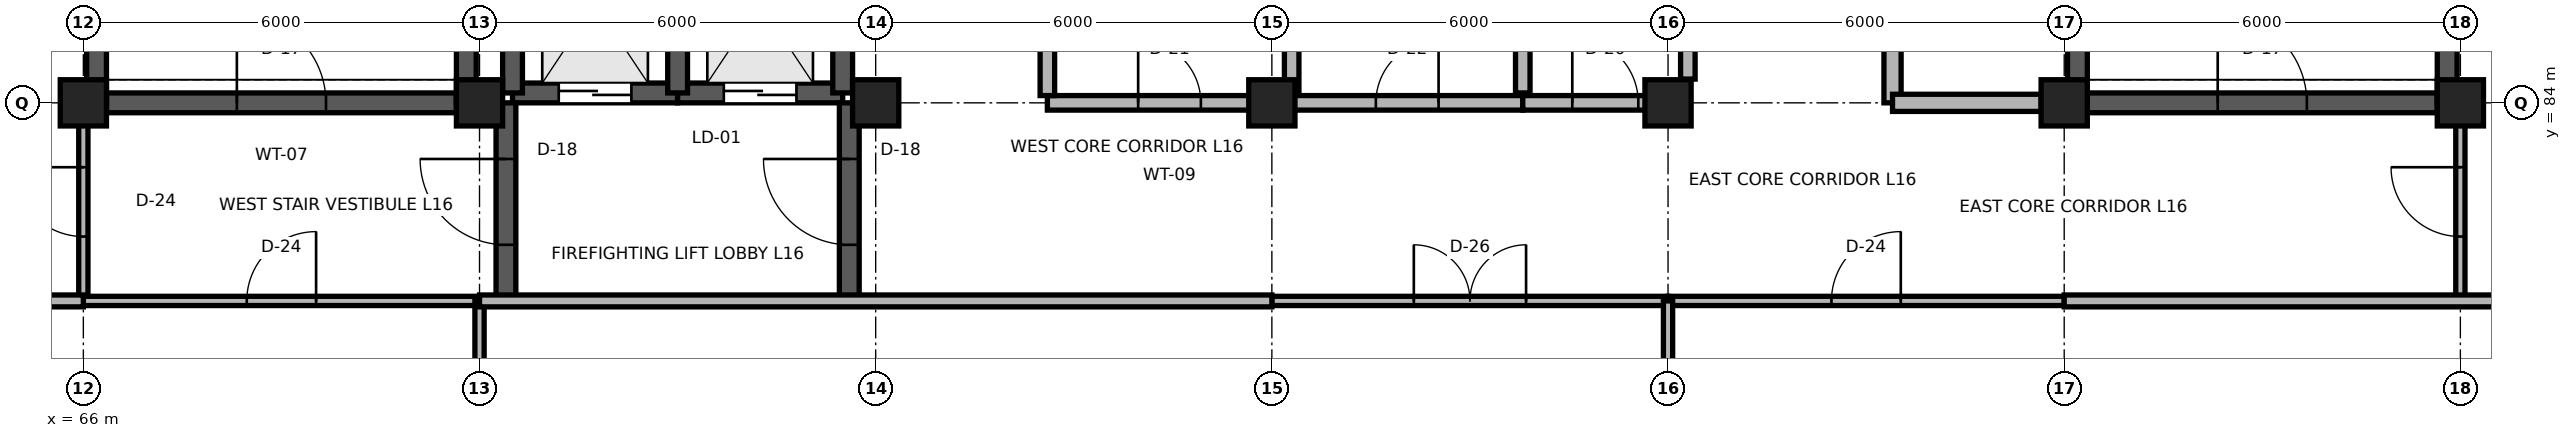
"""IFC4 building model, lengths in metres.
Left out: names, types, materials, properties, quantities, classifications, styles, units other than length and angle.
Written with IfcOpenShell. Run it as: python <this file> out.ifc"""

import sys

from ifc_helpers import new_model, si_unit, direction, frame, frame_2d, origin, origin_2d, place, context, subcontext, project, spatial, rectangle, extrude, element, fill, save


model = new_model("IFC4")
c1 = context("Model", 3, precision=1e-05, world=origin(), true_north=direction((0.0, 1.0)))
c2 = subcontext(c1, "Body", "Model", "MODEL_VIEW")
j1 = project(units=[si_unit("LENGTHUNIT", "METRE"), si_unit("PLANEANGLEUNIT", "RADIAN")], contexts=[c1])
p1 = place(None, origin())
s1 = spatial("IfcSite", under=j1, at=p1, CompositionType="ELEMENT")
p2 = place(p1, origin())
s2 = spatial("IfcBuilding", under=s1, at=p2, CompositionType="ELEMENT")
p3 = place(p2, frame((0.0, 0.0, 63.9)))
s3 = spatial("IfcBuildingStorey", under=s2, at=p3, CompositionType="ELEMENT", Elevation=63.9)
for number, where, z_axis, x_axis in (
    (1, (66.0, 84.0, 0.0), (0.0, 0.0, 1.0), (1.0, 0.0, 0.0)),
    (2, (72.0, 84.0, 0.0), (0.0, 0.0, 1.0), (1.0, 0.0, 0.0)),
    (3, (78.0, 84.0, 0.0), (0.0, 0.0, 1.0), (1.0, 0.0, 0.0)),
    (4, (84.0, 84.0, 0.0), (0.0, 0.0, 1.0), (1.0, 0.0, 0.0)),
    (5, (90.0, 84.0, 0.0), (0.0, 0.0, 1.0), (1.0, 0.0, 0.0)),
    (6, (96.0, 84.0, 0.0), (0.0, 0.0, 1.0), (1.0, 0.0, 0.0)),
    (7, (102.0, 84.0, 0.0), (0.0, 0.0, 1.0), (1.0, 0.0, 0.0)),
):
    element("IfcColumn", number, at=place(p3, frame(where, z_axis=z_axis, x_axis=x_axis)), inside=s3, PredefinedType="COLUMN", context=c2, shape_type="SweptSolid", body=[
        extrude(rectangle(XDim=0.7, YDim=0.7, at=origin_2d()), origin(), (0.0, 0.0, 1.0), 3.9),
    ])
p4 = place(p3, frame((66.35, 84.0, 0.0), z_axis=(0.0, 0.0, 1.0), x_axis=(1.0, 0.0, 0.0)))
e8 = element("IfcWall", 8, at=p4, inside=s3, PredefinedType="SHEAR", context=c2, shape_type="SweptSolid", body=[
    extrude(rectangle(XDim=5.3, YDim=0.3, at=frame_2d((2.65, 0.0))), origin(), (0.0, 0.0, 1.0), 3.66),
])
p5 = place(p4, frame((1.975, 0.0, 0.0)))
e9 = element("IfcOpeningElement", 9, at=p5, cuts=e8, PredefinedType="OPENING", context=c2, shape_type="SweptSolid", body=[
    extrude(rectangle(XDim=1.35, YDim=2.2, at=frame_2d((0.675, 1.1))), frame((0.0, 0.165, 0.0), z_axis=(0.0, -1.0, 0.0), x_axis=(1.0, 0.0, 0.0)), (0.0, 0.0, 1.0), 0.33),
])
for number, where, z_axis, x_axis in (
    (10, (66.2, 84.0, 0.0), (0.0, 0.0, 1.0), (0.0, 1.0, 0.0)),
    (11, (71.8, 84.0, 0.0), (0.0, 0.0, 1.0), (0.0, 1.0, 0.0)),
):
    element("IfcWall", number, at=place(p3, frame(where, z_axis=z_axis, x_axis=x_axis)), inside=s3, PredefinedType="SHEAR", context=c2, shape_type="SweptSolid", body=[
        extrude(rectangle(XDim=11.8, YDim=0.3, at=frame_2d((5.9, 0.0))), origin(), (0.0, 0.0, 1.0), 3.66),
    ])
p6 = place(p3, frame((96.35, 84.0, 0.0), z_axis=(0.0, 0.0, 1.0), x_axis=(1.0, 0.0, 0.0)))
e12 = element("IfcWall", 12, at=p6, inside=s3, PredefinedType="SHEAR", context=c2, shape_type="SweptSolid", body=[
    extrude(rectangle(XDim=5.3, YDim=0.3, at=frame_2d((2.65, 0.0))), origin(), (0.0, 0.0, 1.0), 3.66),
])
p7 = place(p6, frame((1.975, 0.0, 0.0)))
e13 = element("IfcOpeningElement", 13, at=p7, cuts=e12, PredefinedType="OPENING", context=c2, shape_type="SweptSolid", body=[
    extrude(rectangle(XDim=1.35, YDim=2.2, at=frame_2d((0.675, 1.1))), frame((0.0, 0.165, 0.0), z_axis=(0.0, -1.0, 0.0), x_axis=(1.0, 0.0, 0.0)), (0.0, 0.0, 1.0), 0.33),
])
for number, where, z_axis, x_axis in (
    (14, (96.2, 84.0, 0.0), (0.0, 0.0, 1.0), (0.0, 1.0, 0.0)),
    (15, (101.8, 84.0, 0.0), (0.0, 0.0, 1.0), (0.0, 1.0, 0.0)),
):
    element("IfcWall", number, at=place(p3, frame(where, z_axis=z_axis, x_axis=x_axis)), inside=s3, PredefinedType="SHEAR", context=c2, shape_type="SweptSolid", body=[
        extrude(rectangle(XDim=11.8, YDim=0.3, at=frame_2d((5.9, 0.0))), origin(), (0.0, 0.0, 1.0), 3.66),
    ])
p8 = place(p3, frame((72.5, 84.15, 0.0), z_axis=(0.0, 0.0, 1.0), x_axis=(1.0, 0.0, 0.0)))
e16 = element("IfcWall", 16, at=p8, inside=s3, PredefinedType="SHEAR", context=c2, shape_type="SweptSolid", body=[
    extrude(rectangle(XDim=2.5, YDim=0.3, at=frame_2d((1.25, 0.0))), origin(), (0.0, 0.0, 1.0), 3.66),
])
p9 = place(p8, frame((0.7, 0.0, 0.0)))
e17 = element("IfcOpeningElement", 17, at=p9, cuts=e16, PredefinedType="OPENING", context=c2, shape_type="SweptSolid", body=[
    extrude(rectangle(XDim=1.1, YDim=2.1, at=frame_2d((0.55, 1.05))), frame((0.0, 0.165, 0.0), z_axis=(0.0, -1.0, 0.0), x_axis=(1.0, 0.0, 0.0)), (0.0, 0.0, 1.0), 0.33),
])
p10 = place(p3, frame((72.5, 84.15, 0.0), z_axis=(0.0, 0.0, 1.0), x_axis=(0.0, 1.0, 0.0)))
e18 = element("IfcWall", 18, at=p10, inside=s3, PredefinedType="SHEAR", context=c2, shape_type="SweptSolid", body=[
    extrude(rectangle(XDim=3.4, YDim=0.3, at=frame_2d((1.7, 0.0))), origin(), (0.0, 0.0, 1.0), 3.66),
])
p11 = place(p3, frame((75.0, 84.15, 0.0), z_axis=(0.0, 0.0, 1.0), x_axis=(1.0, 0.0, 0.0)))
e19 = element("IfcWall", 19, at=p11, inside=s3, PredefinedType="SHEAR", context=c2, shape_type="SweptSolid", body=[
    extrude(rectangle(XDim=2.5, YDim=0.3, at=frame_2d((1.25, 0.0))), origin(), (0.0, 0.0, 1.0), 3.66),
])
p12 = place(p11, frame((0.7, 0.0, 0.0)))
e20 = element("IfcOpeningElement", 20, at=p12, cuts=e19, PredefinedType="OPENING", context=c2, shape_type="SweptSolid", body=[
    extrude(rectangle(XDim=1.1, YDim=2.1, at=frame_2d((0.55, 1.05))), frame((0.0, 0.165, 0.0), z_axis=(0.0, -1.0, 0.0), x_axis=(1.0, 0.0, 0.0)), (0.0, 0.0, 1.0), 0.33),
])
for number, where, z_axis, x_axis in (
    (21, (75.0, 84.15, 0.0), (0.0, 0.0, 1.0), (0.0, 1.0, 0.0)),
    (22, (77.5, 84.15, 0.0), (0.0, 0.0, 1.0), (0.0, 1.0, 0.0)),
):
    element("IfcWall", number, at=place(p3, frame(where, z_axis=z_axis, x_axis=x_axis)), inside=s3, PredefinedType="SHEAR", context=c2, shape_type="SweptSolid", body=[
        extrude(rectangle(XDim=3.4, YDim=0.3, at=frame_2d((1.7, 0.0))), origin(), (0.0, 0.0, 1.0), 3.66),
    ])
p13 = place(p3, frame((93.4, 84.0, 0.0), z_axis=(0.0, 0.0, 1.0), x_axis=(0.0, 1.0, 0.0)))
e23 = element("IfcWall", 23, at=p13, inside=s3, PredefinedType="PARTITIONING", context=c2, shape_type="SweptSolid", body=[
    extrude(rectangle(XDim=11.96, YDim=0.26, at=frame_2d((5.98, 0.0))), origin(), (0.0, 0.0, 1.0), 3.66),
])
p14 = place(p13, frame((3.425, 0.0, 0.0)))
e24 = element("IfcOpeningElement", 24, at=p14, cuts=e23, PredefinedType="OPENING", context=c2, shape_type="SweptSolid", body=[
    extrude(rectangle(XDim=1.15, YDim=2.2, at=frame_2d((0.575, 1.1))), frame((0.0, 0.145, 0.0), z_axis=(0.0, -1.0, 0.0), x_axis=(1.0, 0.0, 0.0)), (0.0, 0.0, 1.0), 0.29),
])
p15 = place(p3, frame((93.4, 84.0, 0.0), z_axis=(0.0, 0.0, 1.0), x_axis=(1.0, 0.0, 0.0)))
e25 = element("IfcWall", 25, at=p15, inside=s3, PredefinedType="PARTITIONING", context=c2, shape_type="SweptSolid", body=[
    extrude(rectangle(XDim=2.25, YDim=0.26, at=frame_2d((1.125, 0.0))), origin(), (0.0, 0.0, 1.0), 3.369),
])
p16 = place(p3, frame((72.4, 81.0, 0.0), z_axis=(0.0, 0.0, 1.0), x_axis=(0.0, 1.0, 0.0)))
e26 = element("IfcWall", 26, at=p16, inside=s3, PredefinedType="SHEAR", context=c2, shape_type="SweptSolid", body=[
    extrude(rectangle(XDim=3.0, YDim=0.3, at=frame_2d((1.5, 0.0))), origin(), (0.0, 0.0, 1.0), 3.66),
])
p17 = place(p16, frame((0.85, 0.0, 0.0)))
e27 = element("IfcOpeningElement", 27, at=p17, cuts=e26, PredefinedType="OPENING", context=c2, shape_type="SweptSolid", body=[
    extrude(rectangle(XDim=1.3, YDim=2.2, at=frame_2d((0.65, 1.1))), frame((0.0, 0.165, 0.0), z_axis=(0.0, -1.0, 0.0), x_axis=(1.0, 0.0, 0.0)), (0.0, 0.0, 1.0), 0.33),
])
p18 = place(p3, frame((77.6, 81.0, 0.0), z_axis=(0.0, 0.0, 1.0), x_axis=(0.0, 1.0, 0.0)))
e28 = element("IfcWall", 28, at=p18, inside=s3, PredefinedType="SHEAR", context=c2, shape_type="SweptSolid", body=[
    extrude(rectangle(XDim=3.0, YDim=0.3, at=frame_2d((1.5, 0.0))), origin(), (0.0, 0.0, 1.0), 3.66),
])
p19 = place(p18, frame((0.85, 0.0, 0.0)))
e29 = element("IfcOpeningElement", 29, at=p19, cuts=e28, PredefinedType="OPENING", context=c2, shape_type="SweptSolid", body=[
    extrude(rectangle(XDim=1.3, YDim=2.2, at=frame_2d((0.65, 1.1))), frame((0.0, 0.165, 0.0), z_axis=(0.0, -1.0, 0.0), x_axis=(1.0, 0.0, 0.0)), (0.0, 0.0, 1.0), 0.33),
])
p20 = place(p3, frame((80.6, 84.0, 0.0), z_axis=(0.0, 0.0, 1.0), x_axis=(1.0, 0.0, 0.0)))
e30 = element("IfcWall", 30, at=p20, inside=s3, PredefinedType="PARTITIONING", context=c2, shape_type="SweptSolid", body=[
    extrude(rectangle(XDim=3.7, YDim=0.22, at=frame_2d((1.85, 0.0))), origin(), (0.0, 0.0, 1.0), 3.369),
])
p21 = place(p20, frame((1.375, 0.0, 0.0)))
e31 = element("IfcOpeningElement", 31, at=p21, cuts=e30, PredefinedType="OPENING", context=c2, shape_type="SweptSolid", body=[
    extrude(rectangle(XDim=0.95, YDim=2.15, at=frame_2d((0.475, 1.075))), frame((0.0, 0.125, 0.0), z_axis=(0.0, -1.0, 0.0), x_axis=(1.0, 0.0, 0.0)), (0.0, 0.0, 1.0), 0.25),
])
p22 = place(p3, frame((84.3, 84.0, 0.0), z_axis=(0.0, 0.0, 1.0), x_axis=(1.0, 0.0, 0.0)))
e32 = element("IfcWall", 32, at=p22, inside=s3, PredefinedType="PARTITIONING", context=c2, shape_type="SweptSolid", body=[
    extrude(rectangle(XDim=3.5, YDim=0.22, at=frame_2d((1.75, 0.0))), origin(), (0.0, 0.0, 1.0), 3.369),
])
p23 = place(p22, frame((1.275, 0.0, 0.0)))
e33 = element("IfcOpeningElement", 33, at=p23, cuts=e32, PredefinedType="OPENING", context=c2, shape_type="SweptSolid", body=[
    extrude(rectangle(XDim=0.95, YDim=2.1, at=frame_2d((0.475, 1.05))), frame((0.0, 0.125, 0.0), z_axis=(0.0, -1.0, 0.0), x_axis=(1.0, 0.0, 0.0)), (0.0, 0.0, 1.0), 0.25),
])
p24 = place(p3, frame((87.8, 84.0, 0.0), z_axis=(0.0, 0.0, 1.0), x_axis=(1.0, 0.0, 0.0)))
e34 = element("IfcWall", 34, at=p24, inside=s3, PredefinedType="PARTITIONING", context=c2, shape_type="SweptSolid", body=[
    extrude(rectangle(XDim=2.5, YDim=0.22, at=frame_2d((1.25, 0.0))), origin(), (0.0, 0.0, 1.0), 3.369),
])
p25 = place(p24, frame((0.75, 0.0, 0.0)))
e35 = element("IfcOpeningElement", 35, at=p25, cuts=e34, PredefinedType="OPENING", context=c2, shape_type="SweptSolid", body=[
    extrude(rectangle(XDim=1.0, YDim=2.15, at=frame_2d((0.5, 1.075))), frame((0.0, 0.125, 0.0), z_axis=(0.0, -1.0, 0.0), x_axis=(1.0, 0.0, 0.0)), (0.0, 0.0, 1.0), 0.25),
])
for number, where, z_axis, x_axis in (
    (36, (84.3, 84.15, 0.0), (0.0, 0.0, 1.0), (0.0, 1.0, 0.0)),
    (37, (87.8, 84.15, 0.0), (0.0, 0.0, 1.0), (0.0, 1.0, 0.0)),
):
    element("IfcWall", number, at=place(p3, frame(where, z_axis=z_axis, x_axis=x_axis)), inside=s3, PredefinedType="PARTITIONING", context=c2, shape_type="SweptSolid", body=[
        extrude(rectangle(XDim=5.0, YDim=0.22, at=frame_2d((2.5, 0.0))), origin(), (0.0, 0.0, 1.0), 3.66),
    ])
p26 = place(p3, frame((66.0, 81.05, 0.0), z_axis=(0.0, 0.0, 1.0), x_axis=(0.0, 1.0, 0.0)))
e38 = element("IfcWall", 38, at=p26, inside=s3, PredefinedType="PARTITIONING", context=c2, shape_type="SweptSolid", body=[
    extrude(rectangle(XDim=2.9, YDim=0.14, at=frame_2d((1.45, 0.0))), origin(), (0.0, 0.0, 1.0), 3.369),
])
p27 = place(p26, frame((0.925, 0.0, 0.0)))
e39 = element("IfcOpeningElement", 39, at=p27, cuts=e38, PredefinedType="OPENING", context=c2, shape_type="SweptSolid", body=[
    extrude(rectangle(XDim=1.05, YDim=2.25, at=frame_2d((0.525, 1.125))), frame((0.0, 0.085, 0.0), z_axis=(0.0, -1.0, 0.0), x_axis=(1.0, 0.0, 0.0)), (0.0, 0.0, 1.0), 0.17),
])
p28 = place(p3, frame((102.0, 81.05, 0.0), z_axis=(0.0, 0.0, 1.0), x_axis=(0.0, 1.0, 0.0)))
e40 = element("IfcWall", 40, at=p28, inside=s3, PredefinedType="PARTITIONING", context=c2, shape_type="SweptSolid", body=[
    extrude(rectangle(XDim=2.9, YDim=0.14, at=frame_2d((1.45, 0.0))), origin(), (0.0, 0.0, 1.0), 3.369),
])
p29 = place(p28, frame((0.925, 0.0, 0.0)))
e41 = element("IfcOpeningElement", 41, at=p29, cuts=e40, PredefinedType="OPENING", context=c2, shape_type="SweptSolid", body=[
    extrude(rectangle(XDim=1.05, YDim=2.25, at=frame_2d((0.525, 1.125))), frame((0.0, 0.085, 0.0), z_axis=(0.0, -1.0, 0.0), x_axis=(1.0, 0.0, 0.0)), (0.0, 0.0, 1.0), 0.17),
])
p30 = place(p3, frame((66.0, 81.0, 0.0), z_axis=(0.0, 0.0, 1.0), x_axis=(1.0, 0.0, 0.0)))
e42 = element("IfcWall", 42, at=p30, inside=s3, PredefinedType="PARTITIONING", context=c2, shape_type="SweptSolid", body=[
    extrude(rectangle(XDim=6.0, YDim=0.14, at=frame_2d((3.0, 0.0))), origin(), (0.0, 0.0, 1.0), 3.66),
])
p31 = place(p30, frame((2.475, 0.0, 0.0)))
e43 = element("IfcOpeningElement", 43, at=p31, cuts=e42, PredefinedType="OPENING", context=c2, shape_type="SweptSolid", body=[
    extrude(rectangle(XDim=1.05, YDim=2.25, at=frame_2d((0.525, 1.125))), frame((0.0, 0.085, 0.0), z_axis=(0.0, -1.0, 0.0), x_axis=(1.0, 0.0, 0.0)), (0.0, 0.0, 1.0), 0.17),
])
p32 = place(p3, frame((84.0, 81.0, 0.0), z_axis=(0.0, 0.0, 1.0), x_axis=(1.0, 0.0, 0.0)))
e44 = element("IfcWall", 44, at=p32, inside=s3, PredefinedType="PARTITIONING", context=c2, shape_type="SweptSolid", body=[
    extrude(rectangle(XDim=6.0, YDim=0.14, at=frame_2d((3.0, 0.0))), origin(), (0.0, 0.0, 1.0), 3.66),
])
p33 = place(p32, frame((2.15, 0.0, 0.0)))
e45 = element("IfcOpeningElement", 45, at=p33, cuts=e44, PredefinedType="OPENING", context=c2, shape_type="SweptSolid", body=[
    extrude(rectangle(XDim=1.7, YDim=2.45, at=frame_2d((0.85, 1.225))), frame((0.0, 0.085, 0.0), z_axis=(0.0, -1.0, 0.0), x_axis=(1.0, 0.0, 0.0)), (0.0, 0.0, 1.0), 0.17),
])
p34 = place(p3, frame((90.0, 81.0, 0.0), z_axis=(0.0, 0.0, 1.0), x_axis=(1.0, 0.0, 0.0)))
e46 = element("IfcWall", 46, at=p34, inside=s3, PredefinedType="PARTITIONING", context=c2, shape_type="SweptSolid", body=[
    extrude(rectangle(XDim=6.0, YDim=0.14, at=frame_2d((3.0, 0.0))), origin(), (0.0, 0.0, 1.0), 3.66),
])
p35 = place(p34, frame((2.475, 0.0, 0.0)))
e47 = element("IfcOpeningElement", 47, at=p35, cuts=e46, PredefinedType="OPENING", context=c2, shape_type="SweptSolid", body=[
    extrude(rectangle(XDim=1.05, YDim=2.25, at=frame_2d((0.525, 1.125))), frame((0.0, 0.085, 0.0), z_axis=(0.0, -1.0, 0.0), x_axis=(1.0, 0.0, 0.0)), (0.0, 0.0, 1.0), 0.17),
])
for number, where, z_axis, x_axis in (
    (48, (72.0, 78.35, 0.0), (0.0, 0.0, 1.0), (0.0, 1.0, 0.0)),
    (49, (90.0, 78.35, 0.0), (0.0, 0.0, 1.0), (0.0, 1.0, 0.0)),
):
    element("IfcWall", number, at=place(p3, frame(where, z_axis=z_axis, x_axis=x_axis)), inside=s3, PredefinedType="PARTITIONING", context=c2, shape_type="SweptSolid", body=[
        extrude(rectangle(XDim=2.65, YDim=0.14, at=frame_2d((1.325, 0.0))), origin(), (0.0, 0.0, 1.0), 3.369),
    ])
p36 = place(p3, frame((80.6, 84.11, 0.0), z_axis=(0.0, 0.0, 1.0), x_axis=(0.0, 1.0, 0.0)))
e50 = element("IfcWall", 50, at=p36, inside=s3, PredefinedType="PARTITIONING", context=c2, shape_type="SweptSolid", body=[
    extrude(rectangle(XDim=4.98, YDim=0.22, at=frame_2d((2.49, 0.0))), origin(), (0.0, 0.0, 1.0), 3.66),
])
p37 = place(p3, frame((90.3, 84.36, 0.0), z_axis=(0.0, 0.0, 1.0), x_axis=(0.0, 1.0, 0.0)))
e51 = element("IfcWall", 51, at=p37, inside=s3, PredefinedType="PARTITIONING", context=c2, shape_type="SweptSolid", body=[
    extrude(rectangle(XDim=4.73, YDim=0.22, at=frame_2d((2.365, 0.0))), origin(), (0.0, 0.0, 1.0), 3.66),
])
p38 = place(p3, frame((61.7, 81.0, 0.0), z_axis=(0.0, 0.0, 1.0), x_axis=(1.0, 0.0, 0.0)))
e52 = element("IfcWall", 52, at=p38, inside=s3, PredefinedType="PARTITIONING", context=c2, shape_type="SweptSolid", body=[
    extrude(rectangle(XDim=4.3, YDim=0.18, at=frame_2d((2.15, 0.0))), origin(), (0.0, 0.0, 1.0), 3.66),
])
p39 = place(p3, frame((72.0, 81.0, 0.0), z_axis=(0.0, 0.0, 1.0), x_axis=(1.0, 0.0, 0.0)))
e53 = element("IfcWall", 53, at=p39, inside=s3, PredefinedType="PARTITIONING", context=c2, shape_type="SweptSolid", body=[
    extrude(rectangle(XDim=12.0, YDim=0.18, at=frame_2d((6.0, 0.0))), origin(), (0.0, 0.0, 1.0), 3.66),
])
p40 = place(p3, frame((96.0, 81.0, 0.0), z_axis=(0.0, 0.0, 1.0), x_axis=(1.0, 0.0, 0.0)))
e54 = element("IfcWall", 54, at=p40, inside=s3, PredefinedType="PARTITIONING", context=c2, shape_type="SweptSolid", body=[
    extrude(rectangle(XDim=10.3, YDim=0.18, at=frame_2d((5.15, 0.0))), origin(), (0.0, 0.0, 1.0), 3.66),
])
p41 = place(p5, origin())
e55 = element("IfcDoor", 55, at=p41, inside=s3, OperationType="SINGLE_SWING_LEFT", PredefinedType="DOOR", context=c2, shape_type="SweptSolid", body=[
    extrude(rectangle(XDim=1.35, YDim=2.2, at=frame_2d((0.675, 1.1))), frame((0.0, 0.025, 0.0), z_axis=(0.0, -1.0, 0.0), x_axis=(1.0, 0.0, 0.0)), (0.0, 0.0, 1.0), 0.05),
])
fill(e9, e55)
p42 = place(p7, origin())
e56 = element("IfcDoor", 56, at=p42, inside=s3, OperationType="SINGLE_SWING_LEFT", PredefinedType="DOOR", context=c2, shape_type="SweptSolid", body=[
    extrude(rectangle(XDim=1.35, YDim=2.2, at=frame_2d((0.675, 1.1))), frame((0.0, 0.025, 0.0), z_axis=(0.0, -1.0, 0.0), x_axis=(1.0, 0.0, 0.0)), (0.0, 0.0, 1.0), 0.05),
])
fill(e13, e56)
p43 = place(p9, origin())
e57 = element("IfcDoor", 57, at=p43, inside=s3, OperationType="DOUBLE_DOOR_SLIDING", PredefinedType="DOOR", context=c2, shape_type="SweptSolid", body=[
    extrude(rectangle(XDim=1.1, YDim=2.1, at=frame_2d((0.55, 1.05))), frame((0.0, 0.025, 0.0), z_axis=(0.0, -1.0, 0.0), x_axis=(1.0, 0.0, 0.0)), (0.0, 0.0, 1.0), 0.05),
])
fill(e17, e57)
p44 = place(p12, origin())
e58 = element("IfcDoor", 58, at=p44, inside=s3, OperationType="DOUBLE_DOOR_SLIDING", PredefinedType="DOOR", context=c2, shape_type="SweptSolid", body=[
    extrude(rectangle(XDim=1.1, YDim=2.1, at=frame_2d((0.55, 1.05))), frame((0.0, 0.025, 0.0), z_axis=(0.0, -1.0, 0.0), x_axis=(1.0, 0.0, 0.0)), (0.0, 0.0, 1.0), 0.05),
])
fill(e20, e58)
p45 = place(p17, origin())
e59 = element("IfcDoor", 59, at=p45, inside=s3, OperationType="SINGLE_SWING_RIGHT", PredefinedType="DOOR", context=c2, shape_type="SweptSolid", body=[
    extrude(rectangle(XDim=1.3, YDim=2.2, at=frame_2d((0.65, 1.1))), frame((0.0, 0.025, 0.0), z_axis=(0.0, -1.0, 0.0), x_axis=(1.0, 0.0, 0.0)), (0.0, 0.0, 1.0), 0.05),
])
fill(e27, e59)
p46 = place(p19, origin())
e60 = element("IfcDoor", 60, at=p46, inside=s3, OperationType="SINGLE_SWING_RIGHT", PredefinedType="DOOR", context=c2, shape_type="SweptSolid", body=[
    extrude(rectangle(XDim=1.3, YDim=2.2, at=frame_2d((0.65, 1.1))), frame((0.0, 0.025, 0.0), z_axis=(0.0, -1.0, 0.0), x_axis=(1.0, 0.0, 0.0)), (0.0, 0.0, 1.0), 0.05),
])
fill(e29, e60)
p47 = place(p21, origin())
e61 = element("IfcDoor", 61, at=p47, inside=s3, OperationType="SINGLE_SWING_LEFT", PredefinedType="DOOR", context=c2, shape_type="SweptSolid", body=[
    extrude(rectangle(XDim=0.95, YDim=2.15, at=frame_2d((0.475, 1.075))), frame((0.0, 0.025, 0.0), z_axis=(0.0, -1.0, 0.0), x_axis=(1.0, 0.0, 0.0)), (0.0, 0.0, 1.0), 0.05),
])
fill(e31, e61)
p48 = place(p23, origin())
e62 = element("IfcDoor", 62, at=p48, inside=s3, OperationType="SINGLE_SWING_RIGHT", PredefinedType="DOOR", context=c2, shape_type="SweptSolid", body=[
    extrude(rectangle(XDim=0.95, YDim=2.1, at=frame_2d((0.475, 1.05))), frame((0.0, 0.025, 0.0), z_axis=(0.0, -1.0, 0.0), x_axis=(1.0, 0.0, 0.0)), (0.0, 0.0, 1.0), 0.05),
])
fill(e33, e62)
p49 = place(p25, origin())
e63 = element("IfcDoor", 63, at=p49, inside=s3, OperationType="SINGLE_SWING_LEFT", PredefinedType="DOOR", context=c2, shape_type="SweptSolid", body=[
    extrude(rectangle(XDim=1.0, YDim=2.15, at=frame_2d((0.5, 1.075))), frame((0.0, 0.025, 0.0), z_axis=(0.0, -1.0, 0.0), x_axis=(1.0, 0.0, 0.0)), (0.0, 0.0, 1.0), 0.05),
])
fill(e35, e63)
p50 = place(p27, origin())
e64 = element("IfcDoor", 64, at=p50, inside=s3, OperationType="SINGLE_SWING_RIGHT", PredefinedType="DOOR", context=c2, shape_type="SweptSolid", body=[
    extrude(rectangle(XDim=1.05, YDim=2.25, at=frame_2d((0.525, 1.125))), frame((0.0, 0.025, 0.0), z_axis=(0.0, -1.0, 0.0), x_axis=(1.0, 0.0, 0.0)), (0.0, 0.0, 1.0), 0.05),
])
fill(e39, e64)
p51 = place(p29, origin())
e65 = element("IfcDoor", 65, at=p51, inside=s3, OperationType="SINGLE_SWING_RIGHT", PredefinedType="DOOR", context=c2, shape_type="SweptSolid", body=[
    extrude(rectangle(XDim=1.05, YDim=2.25, at=frame_2d((0.525, 1.125))), frame((0.0, 0.025, 0.0), z_axis=(0.0, -1.0, 0.0), x_axis=(1.0, 0.0, 0.0)), (0.0, 0.0, 1.0), 0.05),
])
fill(e41, e65)
p52 = place(p31, origin())
e66 = element("IfcDoor", 66, at=p52, inside=s3, OperationType="SINGLE_SWING_RIGHT", PredefinedType="DOOR", context=c2, shape_type="SweptSolid", body=[
    extrude(rectangle(XDim=1.05, YDim=2.25, at=frame_2d((0.525, 1.125))), frame((0.0, 0.025, 0.0), z_axis=(0.0, -1.0, 0.0), x_axis=(1.0, 0.0, 0.0)), (0.0, 0.0, 1.0), 0.05),
])
fill(e43, e66)
p53 = place(p33, origin())
e67 = element("IfcDoor", 67, at=p53, inside=s3, OperationType="DOUBLE_DOOR_SINGLE_SWING", PredefinedType="DOOR", context=c2, shape_type="SweptSolid", body=[
    extrude(rectangle(XDim=1.7, YDim=2.45, at=frame_2d((0.85, 1.225))), frame((0.0, 0.025, 0.0), z_axis=(0.0, -1.0, 0.0), x_axis=(1.0, 0.0, 0.0)), (0.0, 0.0, 1.0), 0.05),
])
fill(e45, e67)
p54 = place(p35, origin())
e68 = element("IfcDoor", 68, at=p54, inside=s3, OperationType="SINGLE_SWING_RIGHT", PredefinedType="DOOR", context=c2, shape_type="SweptSolid", body=[
    extrude(rectangle(XDim=1.05, YDim=2.25, at=frame_2d((0.525, 1.125))), frame((0.0, 0.025, 0.0), z_axis=(0.0, -1.0, 0.0), x_axis=(1.0, 0.0, 0.0)), (0.0, 0.0, 1.0), 0.05),
])
fill(e47, e68)
save(model, sys.argv[1])
